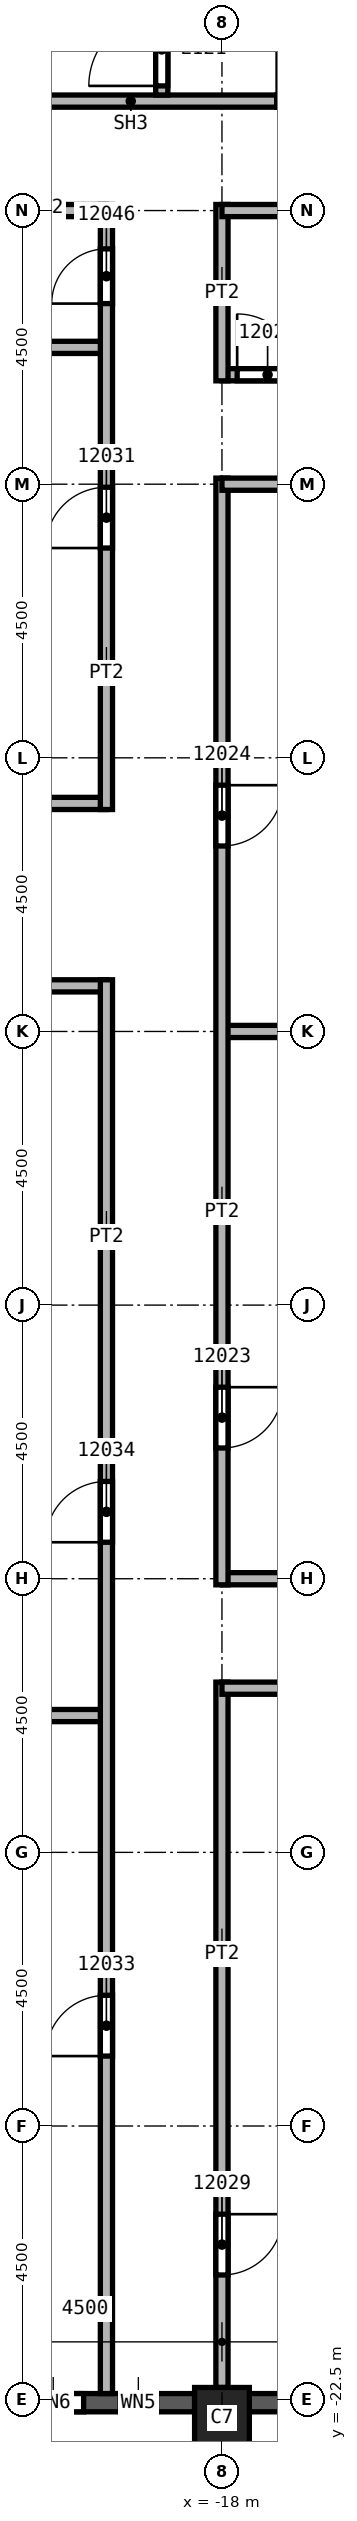
"""IFC4 building model, lengths in metres.
Left out: names, types, materials, properties, quantities, classifications, styles, units other than length and angle.
Written with IfcOpenShell. Run it as: python <this file> out.ifc"""

import sys

from ifc_helpers import new_model, si_unit, direction, frame, frame_2d, origin, origin_2d, place, context, subcontext, project, spatial, rectangle, extrude, element, fill, save


model = new_model("IFC4")
c1 = context("Model", 3, precision=1e-05, world=origin(), true_north=direction((0.0, 1.0)))
c2 = subcontext(c1, "Body", "Model", "MODEL_VIEW")
j1 = project(units=[si_unit("LENGTHUNIT", "METRE"), si_unit("PLANEANGLEUNIT", "RADIAN")], contexts=[c1])
p1 = place(None, origin())
s1 = spatial("IfcSite", under=j1, at=p1, CompositionType="ELEMENT")
p2 = place(p1, origin())
s2 = spatial("IfcBuilding", under=s1, at=p2, CompositionType="ELEMENT")
p3 = place(p2, frame((0.0, 0.0, 196.0)))
s3 = spatial("IfcBuildingStorey", under=s2, at=p3, CompositionType="ELEMENT", Elevation=196.0)
p4 = place(p3, frame((-18.0, -22.8, 0.0), z_axis=(0.0, 0.0, 1.0), x_axis=(1.0, 0.0, 0.0)))
e1 = element("IfcColumn", 1, at=p4, inside=s3, PredefinedType="COLUMN", context=c2, shape_type="SweptSolid", body=[
    extrude(rectangle(XDim=0.9, YDim=1.0, at=origin_2d()), origin(), (0.0, 0.0, 1.0), 3.72),
])
p5 = place(p3, frame((-22.05, -22.55, 0.0), z_axis=(0.0, 0.0, 1.0), x_axis=(1.0, 0.0, 0.0)))
e2 = element("IfcWall", 2, at=p5, inside=s3, PredefinedType="SOLIDWALL", context=c2, shape_type="SweptSolid", body=[
    extrude(rectangle(XDim=3.6, YDim=0.3, at=frame_2d((1.8, 0.0))), origin(), (0.0, 0.0, 1.0), 3.12),
])
p6 = place(p5, frame((0.775, 0.0, 0.8)))
e3 = element("IfcOpeningElement", 3, at=p6, cuts=e2, PredefinedType="OPENING", context=c2, shape_type="SweptSolid", body=[
    extrude(rectangle(XDim=1.0, YDim=1.95, at=frame_2d((0.5, 0.975))), frame((0.0, 0.15, 0.0), z_axis=(0.0, -1.0, 0.0), x_axis=(1.0, 0.0, 0.0)), (0.0, 0.0, 1.0), 0.3),
])
p7 = place(p5, frame((2.375, 0.0, 0.8)))
e4 = element("IfcOpeningElement", 4, at=p7, cuts=e2, PredefinedType="OPENING", context=c2, shape_type="SweptSolid", body=[
    extrude(rectangle(XDim=0.6, YDim=1.95, at=frame_2d((0.3, 0.975))), frame((0.0, 0.15, 0.0), z_axis=(0.0, -1.0, 0.0), x_axis=(1.0, 0.0, 0.0)), (0.0, 0.0, 1.0), 0.3),
])
p8 = place(p3, frame((-17.55, -22.55, 0.0), z_axis=(0.0, 0.0, 1.0), x_axis=(1.0, 0.0, 0.0)))
e5 = element("IfcWall", 5, at=p8, inside=s3, PredefinedType="SOLIDWALL", context=c2, shape_type="SweptSolid", body=[
    extrude(rectangle(XDim=3.6, YDim=0.3, at=frame_2d((1.8, 0.0))), origin(), (0.0, 0.0, 1.0), 3.12),
])
p9 = place(p8, frame((0.6, 0.0, 0.8)))
e6 = element("IfcOpeningElement", 6, at=p9, cuts=e5, PredefinedType="OPENING", context=c2, shape_type="SweptSolid", body=[
    extrude(rectangle(XDim=2.4, YDim=1.95, at=frame_2d((1.2, 0.975))), frame((0.0, 0.15, 0.0), z_axis=(0.0, -1.0, 0.0), x_axis=(1.0, 0.0, 0.0)), (0.0, 0.0, 1.0), 0.3),
])
p10 = place(p3, frame((-33.85, 3.75, 0.0), z_axis=(0.0, 0.0, 1.0), x_axis=(1.0, 0.0, 0.0)))
e7 = element("IfcWall", 7, at=p10, inside=s3, PredefinedType="PARTITIONING", context=c2, shape_type="SweptSolid", body=[
    extrude(rectangle(XDim=13.95, YDim=0.2, at=frame_2d((6.975, 0.0))), origin(), (0.0, 0.0, 1.0), 3.72),
])
p11 = place(p3, frame((-19.9, 0.75, 0.0), z_axis=(0.0, 0.0, 1.0), x_axis=(-1.0, 0.0, 0.0)))
e8 = element("IfcWall", 8, at=p11, inside=s3, PredefinedType="PARTITIONING", context=c2, shape_type="SweptSolid", body=[
    extrude(rectangle(XDim=13.95, YDim=0.2, at=frame_2d((6.975, 0.0))), origin(), (0.0, 0.0, 1.0), 3.72),
])
p12 = place(p11, frame((7.85, 0.0, 0.0)))
e9 = element("IfcOpeningElement", 9, at=p12, cuts=e8, PredefinedType="OPENING", context=c2, shape_type="SweptSolid", body=[
    extrude(rectangle(XDim=1.0, YDim=2.1, at=frame_2d((0.5, 1.05))), frame((0.0, 0.1, 0.0), z_axis=(0.0, -1.0, 0.0), x_axis=(1.0, 0.0, 0.0)), (0.0, 0.0, 1.0), 0.2),
])
p13 = place(p3, frame((-27.1, 11.25, 0.0), z_axis=(0.0, 0.0, 1.0), x_axis=(1.0, 0.0, 0.0)))
e10 = element("IfcWall", 10, at=p13, inside=s3, PredefinedType="PARTITIONING", context=c2, shape_type="SweptSolid", body=[
    extrude(rectangle(XDim=7.2, YDim=0.2, at=frame_2d((3.6, 0.0))), origin(), (0.0, 0.0, 1.0), 3.72),
])
p14 = place(p3, frame((-24.5, -11.25, 0.0), z_axis=(0.0, 0.0, 1.0), x_axis=(1.0, 0.0, 0.0)))
e11 = element("IfcWall", 11, at=p14, inside=s3, PredefinedType="PARTITIONING", context=c2, shape_type="SweptSolid", body=[
    extrude(rectangle(XDim=4.6, YDim=0.2, at=frame_2d((2.3, 0.0))), origin(), (0.0, 0.0, 1.0), 3.72),
])
p15 = place(p3, frame((-19.9, -22.4, 0.0), z_axis=(0.0, 0.0, 1.0), x_axis=(0.0, 1.0, 0.0)))
e12 = element("IfcWall", 12, at=p15, inside=s3, PredefinedType="PARTITIONING", context=c2, shape_type="SweptSolid", body=[
    extrude(rectangle(XDim=23.25, YDim=0.2, at=frame_2d((11.625, 0.0))), origin(), (0.0, 0.0, 1.0), 3.72),
])
p16 = place(p15, frame((5.55, 0.0, 0.0)))
e13 = element("IfcOpeningElement", 13, at=p16, cuts=e12, PredefinedType="OPENING", context=c2, shape_type="SweptSolid", body=[
    extrude(rectangle(XDim=1.0, YDim=2.1, at=frame_2d((0.5, 1.05))), frame((0.0, 0.1, 0.0), z_axis=(0.0, -1.0, 0.0), x_axis=(1.0, 0.0, 0.0)), (0.0, 0.0, 1.0), 0.2),
])
p17 = place(p15, frame((14.0, 0.0, 0.0)))
e14 = element("IfcOpeningElement", 14, at=p17, cuts=e12, PredefinedType="OPENING", context=c2, shape_type="SweptSolid", body=[
    extrude(rectangle(XDim=1.0, YDim=2.1, at=frame_2d((0.5, 1.05))), frame((0.0, 0.1, 0.0), z_axis=(0.0, -1.0, 0.0), x_axis=(1.0, 0.0, 0.0)), (0.0, 0.0, 1.0), 0.2),
])
p18 = place(p3, frame((-19.9, 3.65, 0.0), z_axis=(0.0, 0.0, 1.0), x_axis=(0.0, 1.0, 0.0)))
e15 = element("IfcWall", 15, at=p18, inside=s3, PredefinedType="PARTITIONING", context=c2, shape_type="SweptSolid", body=[
    extrude(rectangle(XDim=9.95, YDim=0.2, at=frame_2d((4.975, 0.0))), origin(), (0.0, 0.0, 1.0), 3.72),
])
p19 = place(p18, frame((4.3, 0.0, 0.0)))
e16 = element("IfcOpeningElement", 16, at=p19, cuts=e15, PredefinedType="OPENING", context=c2, shape_type="SweptSolid", body=[
    extrude(rectangle(XDim=1.0, YDim=2.1, at=frame_2d((0.5, 1.05))), frame((0.0, 0.1, 0.0), z_axis=(0.0, -1.0, 0.0), x_axis=(1.0, 0.0, 0.0)), (0.0, 0.0, 1.0), 0.2),
])
p20 = place(p18, frame((8.32, 0.0, 0.0)))
e17 = element("IfcOpeningElement", 17, at=p20, cuts=e15, PredefinedType="OPENING", context=c2, shape_type="SweptSolid", body=[
    extrude(rectangle(XDim=0.9, YDim=2.1, at=frame_2d((0.45, 1.05))), frame((0.0, 0.1, 0.0), z_axis=(0.0, -1.0, 0.0), x_axis=(1.0, 0.0, 0.0)), (0.0, 0.0, 1.0), 0.2),
])
p21 = place(p3, frame((-19.9, 13.5, 0.0), z_axis=(0.0, 0.0, 1.0), x_axis=(-1.0, 0.0, 0.0)))
e18 = element("IfcWall", 18, at=p21, inside=s3, PredefinedType="PARTITIONING", context=c2, shape_type="SweptSolid", body=[
    extrude(rectangle(XDim=2.1, YDim=0.2, at=frame_2d((1.05, 0.0))), origin(), (0.0, 0.0, 1.0), 3.72),
])
p22 = place(p3, frame((-18.0, -10.7, 0.0), z_axis=(0.0, 0.0, 1.0), x_axis=(0.0, -1.0, 0.0)))
e19 = element("IfcWall", 19, at=p22, inside=s3, PredefinedType="PARTITIONING", context=c2, shape_type="SweptSolid", body=[
    extrude(rectangle(XDim=11.6, YDim=0.2, at=frame_2d((5.8, 0.0))), origin(), (0.0, 0.0, 1.0), 3.72),
])
p23 = place(p22, frame((8.75, 0.0, 0.0)))
e20 = element("IfcOpeningElement", 20, at=p23, cuts=e19, PredefinedType="OPENING", context=c2, shape_type="SweptSolid", body=[
    extrude(rectangle(XDim=1.0, YDim=2.1, at=frame_2d((0.5, 1.05))), frame((0.0, 0.1, 0.0), z_axis=(0.0, -1.0, 0.0), x_axis=(1.0, 0.0, 0.0)), (0.0, 0.0, 1.0), 0.2),
])
for number, where, z_axis, x_axis in (
    (21, (-18.0, -9.0, 0.0), (0.0, 0.0, 1.0), (1.0, 0.0, 0.0)),
    (22, (-18.0, 0.0, 0.0), (0.0, 0.0, 1.0), (1.0, 0.0, 0.0)),
):
    element("IfcWall", number, at=place(p3, frame(where, z_axis=z_axis, x_axis=x_axis)), inside=s3, PredefinedType="PARTITIONING", context=c2, shape_type="SweptSolid", body=[
        extrude(rectangle(XDim=4.5, YDim=0.2, at=frame_2d((2.25, 0.0))), origin(), (0.0, 0.0, 1.0), 3.72),
    ])
p24 = place(p3, frame((-18.0, 9.1, 0.0), z_axis=(0.0, 0.0, 1.0), x_axis=(0.0, -1.0, 0.0)))
e23 = element("IfcWall", 23, at=p24, inside=s3, PredefinedType="PARTITIONING", context=c2, shape_type="SweptSolid", body=[
    extrude(rectangle(XDim=18.2, YDim=0.2, at=frame_2d((9.1, 0.0))), origin(), (0.0, 0.0, 1.0), 3.72),
])
p25 = place(p24, frame((14.95, 0.0, 0.0)))
e24 = element("IfcOpeningElement", 24, at=p25, cuts=e23, PredefinedType="OPENING", context=c2, shape_type="SweptSolid", body=[
    extrude(rectangle(XDim=1.0, YDim=2.1, at=frame_2d((0.5, 1.05))), frame((0.0, 0.1, 0.0), z_axis=(0.0, -1.0, 0.0), x_axis=(1.0, 0.0, 0.0)), (0.0, 0.0, 1.0), 0.2),
])
p26 = place(p24, frame((5.05, 0.0, 0.0)))
e25 = element("IfcOpeningElement", 25, at=p26, cuts=e23, PredefinedType="OPENING", context=c2, shape_type="SweptSolid", body=[
    extrude(rectangle(XDim=1.0, YDim=2.1, at=frame_2d((0.5, 1.05))), frame((0.0, 0.1, 0.0), z_axis=(0.0, -1.0, 0.0), x_axis=(1.0, 0.0, 0.0)), (0.0, 0.0, 1.0), 0.2),
])
p27 = place(p3, frame((-18.0, 10.8, 0.0), z_axis=(0.0, 0.0, 1.0), x_axis=(1.0, 0.0, 0.0)))
e26 = element("IfcWall", 26, at=p27, inside=s3, PredefinedType="PARTITIONING", context=c2, shape_type="SweptSolid", body=[
    extrude(rectangle(XDim=3.6, YDim=0.2, at=frame_2d((1.8, 0.0))), origin(), (0.0, 0.0, 1.0), 3.72),
])
p28 = place(p27, frame((0.25, 0.0, 0.0)))
e27 = element("IfcOpeningElement", 27, at=p28, cuts=e26, PredefinedType="OPENING", context=c2, shape_type="SweptSolid", body=[
    extrude(rectangle(XDim=1.0, YDim=2.1, at=frame_2d((0.5, 1.05))), frame((0.0, 0.1, 0.0), z_axis=(0.0, -1.0, 0.0), x_axis=(1.0, 0.0, 0.0)), (0.0, 0.0, 1.0), 0.2),
])
p29 = place(p3, frame((-18.0, 13.6, 0.0), z_axis=(0.0, 0.0, 1.0), x_axis=(0.0, -1.0, 0.0)))
e28 = element("IfcWall", 28, at=p29, inside=s3, PredefinedType="PARTITIONING", context=c2, shape_type="SweptSolid", body=[
    extrude(rectangle(XDim=2.9, YDim=0.2, at=frame_2d((1.45, 0.0))), origin(), (0.0, 0.0, 1.0), 3.72),
])
p30 = place(p3, frame((-15.3, 13.5, 0.0), z_axis=(0.0, 0.0, 1.0), x_axis=(-1.0, 0.0, 0.0)))
e29 = element("IfcWall", 29, at=p30, inside=s3, PredefinedType="PARTITIONING", context=c2, shape_type="SweptSolid", body=[
    extrude(rectangle(XDim=2.7, YDim=0.2, at=frame_2d((1.35, 0.0))), origin(), (0.0, 0.0, 1.0), 3.72),
])
p31 = place(p3, frame((-14.4, -10.8, 0.0), z_axis=(0.0, 0.0, 1.0), x_axis=(-1.0, 0.0, 0.0)))
e30 = element("IfcWall", 30, at=p31, inside=s3, PredefinedType="PARTITIONING", context=c2, shape_type="SweptSolid", body=[
    extrude(rectangle(XDim=3.6, YDim=0.2, at=frame_2d((1.8, 0.0))), origin(), (0.0, 0.0, 1.0), 3.72),
])
p32 = place(p3, frame((-13.5, 9.0, 0.0), z_axis=(0.0, 0.0, 1.0), x_axis=(-1.0, 0.0, 0.0)))
e31 = element("IfcWall", 31, at=p32, inside=s3, PredefinedType="PARTITIONING", context=c2, shape_type="SweptSolid", body=[
    extrude(rectangle(XDim=4.5, YDim=0.2, at=frame_2d((2.25, 0.0))), origin(), (0.0, 0.0, 1.0), 3.72),
])
p33 = place(p3, frame((-21.9, 15.3, 0.0), z_axis=(0.0, 0.0, 1.0), x_axis=(1.0, 0.0, 0.0)))
e32 = element("IfcWall", 32, at=p33, inside=s3, PredefinedType="SOLIDWALL", context=c2, shape_type="SweptSolid", body=[
    extrude(rectangle(XDim=8.275, YDim=0.2, at=frame_2d((4.137, 0.0))), origin(), (0.0, 0.0, 1.0), 3.72),
])
p34 = place(p33, frame((4.8, 0.0, 0.0)))
e33 = element("IfcOpeningElement", 33, at=p34, cuts=e32, PredefinedType="OPENING", context=c2, shape_type="SweptSolid", body=[
    extrude(rectangle(XDim=1.2, YDim=2.1, at=frame_2d((0.6, 1.05))), frame((0.0, 0.1, 0.0), z_axis=(0.0, -1.0, 0.0), x_axis=(1.0, 0.0, 0.0)), (0.0, 0.0, 1.0), 0.2),
])
p35 = place(p3, frame((-18.99, 15.4, 0.0), z_axis=(0.0, 0.0, 1.0), x_axis=(0.0, 1.0, 0.0)))
e34 = element("IfcWall", 34, at=p35, inside=s3, PredefinedType="SOLIDWALL", context=c2, shape_type="SweptSolid", body=[
    extrude(rectangle(XDim=5.9, YDim=0.2, at=frame_2d((2.95, 0.0))), origin(), (0.0, 0.0, 1.0), 3.72),
])
p36 = place(p35, frame((0.15, 0.0, 0.0)))
e35 = element("IfcOpeningElement", 35, at=p36, cuts=e34, PredefinedType="OPENING", context=c2, shape_type="SweptSolid", body=[
    extrude(rectangle(XDim=1.2, YDim=2.1, at=frame_2d((0.6, 1.05))), frame((0.0, 0.1, 0.0), z_axis=(0.0, -1.0, 0.0), x_axis=(1.0, 0.0, 0.0)), (0.0, 0.0, 1.0), 0.2),
])
p37 = place(p25, origin())
e36 = element("IfcDoor", 36, at=p37, inside=s3, OperationType="SINGLE_SWING_RIGHT", PredefinedType="DOOR", context=c2, shape_type="SweptSolid", body=[
    extrude(rectangle(XDim=1.0, YDim=2.1, at=frame_2d((0.5, 1.05))), frame((0.0, 0.025, 0.0), z_axis=(0.0, -1.0, 0.0), x_axis=(1.0, 0.0, 0.0)), (0.0, 0.0, 1.0), 0.05),
])
fill(e24, e36)
p38 = place(p26, origin())
e37 = element("IfcDoor", 37, at=p38, inside=s3, OperationType="SINGLE_SWING_LEFT", PredefinedType="DOOR", context=c2, shape_type="SweptSolid", body=[
    extrude(rectangle(XDim=1.0, YDim=2.1, at=frame_2d((0.5, 1.05))), frame((0.0, 0.025, 0.0), z_axis=(0.0, -1.0, 0.0), x_axis=(1.0, 0.0, 0.0)), (0.0, 0.0, 1.0), 0.05),
])
fill(e25, e37)
p39 = place(p28, origin())
e38 = element("IfcDoor", 38, at=p39, inside=s3, OperationType="SINGLE_SWING_RIGHT", PredefinedType="DOOR", context=c2, shape_type="SweptSolid", body=[
    extrude(rectangle(XDim=1.0, YDim=2.1, at=frame_2d((0.5, 1.05))), frame((0.0, 0.025, 0.0), z_axis=(0.0, -1.0, 0.0), x_axis=(1.0, 0.0, 0.0)), (0.0, 0.0, 1.0), 0.05),
])
fill(e27, e38)
p40 = place(p23, origin())
e39 = element("IfcDoor", 39, at=p40, inside=s3, OperationType="SINGLE_SWING_RIGHT", PredefinedType="DOOR", context=c2, shape_type="SweptSolid", body=[
    extrude(rectangle(XDim=1.0, YDim=2.1, at=frame_2d((0.5, 1.05))), frame((0.0, 0.025, 0.0), z_axis=(0.0, -1.0, 0.0), x_axis=(1.0, 0.0, 0.0)), (0.0, 0.0, 1.0), 0.05),
])
fill(e20, e39)
p41 = place(p19, origin())
e40 = element("IfcDoor", 40, at=p41, inside=s3, OperationType="SINGLE_SWING_RIGHT", PredefinedType="DOOR", context=c2, shape_type="SweptSolid", body=[
    extrude(rectangle(XDim=1.0, YDim=2.1, at=frame_2d((0.5, 1.05))), frame((0.0, 0.025, 0.0), z_axis=(0.0, -1.0, 0.0), x_axis=(1.0, 0.0, 0.0)), (0.0, 0.0, 1.0), 0.05),
])
fill(e16, e40)
p42 = place(p16, origin())
e41 = element("IfcDoor", 41, at=p42, inside=s3, OperationType="SINGLE_SWING_RIGHT", PredefinedType="DOOR", context=c2, shape_type="SweptSolid", body=[
    extrude(rectangle(XDim=1.0, YDim=2.1, at=frame_2d((0.5, 1.05))), frame((0.0, 0.025, 0.0), z_axis=(0.0, -1.0, 0.0), x_axis=(1.0, 0.0, 0.0)), (0.0, 0.0, 1.0), 0.05),
])
fill(e13, e41)
p43 = place(p17, origin())
e42 = element("IfcDoor", 42, at=p43, inside=s3, OperationType="SINGLE_SWING_LEFT", PredefinedType="DOOR", context=c2, shape_type="SweptSolid", body=[
    extrude(rectangle(XDim=1.0, YDim=2.1, at=frame_2d((0.5, 1.05))), frame((0.0, 0.025, 0.0), z_axis=(0.0, -1.0, 0.0), x_axis=(1.0, 0.0, 0.0)), (0.0, 0.0, 1.0), 0.05),
])
fill(e14, e42)
p44 = place(p20, origin())
e43 = element("IfcDoor", 43, at=p44, inside=s3, OperationType="SINGLE_SWING_LEFT", PredefinedType="DOOR", context=c2, shape_type="SweptSolid", body=[
    extrude(rectangle(XDim=0.9, YDim=2.1, at=frame_2d((0.45, 1.05))), frame((0.0, 0.025, 0.0), z_axis=(0.0, -1.0, 0.0), x_axis=(1.0, 0.0, 0.0)), (0.0, 0.0, 1.0), 0.05),
])
fill(e17, e43)
p45 = place(p36, origin())
e44 = element("IfcDoor", 44, at=p45, inside=s3, OperationType="SINGLE_SWING_LEFT", PredefinedType="DOOR", context=c2, shape_type="SweptSolid", body=[
    extrude(rectangle(XDim=1.2, YDim=2.1, at=frame_2d((0.6, 1.05))), frame((0.0, 0.025, 0.0), z_axis=(0.0, -1.0, 0.0), x_axis=(1.0, 0.0, 0.0)), (0.0, 0.0, 1.0), 0.05),
])
fill(e35, e44)
p46 = place(p6, origin())
e45 = element("IfcWindow", 45, at=p46, inside=s3, PartitioningType="SINGLE_PANEL", PredefinedType="WINDOW", context=c2, shape_type="SweptSolid", body=[
    extrude(rectangle(XDim=1.0, YDim=1.95, at=frame_2d((0.5, 0.975))), frame((0.0, 0.03, 0.0), z_axis=(0.0, -1.0, 0.0), x_axis=(1.0, 0.0, 0.0)), (0.0, 0.0, 1.0), 0.06),
])
fill(e3, e45)
p47 = place(p7, origin())
e46 = element("IfcWindow", 46, at=p47, inside=s3, PartitioningType="SINGLE_PANEL", PredefinedType="WINDOW", context=c2, shape_type="SweptSolid", body=[
    extrude(rectangle(XDim=0.6, YDim=1.95, at=frame_2d((0.3, 0.975))), frame((0.0, 0.03, 0.0), z_axis=(0.0, -1.0, 0.0), x_axis=(1.0, 0.0, 0.0)), (0.0, 0.0, 1.0), 0.06),
])
fill(e4, e46)
save(model, sys.argv[1])
